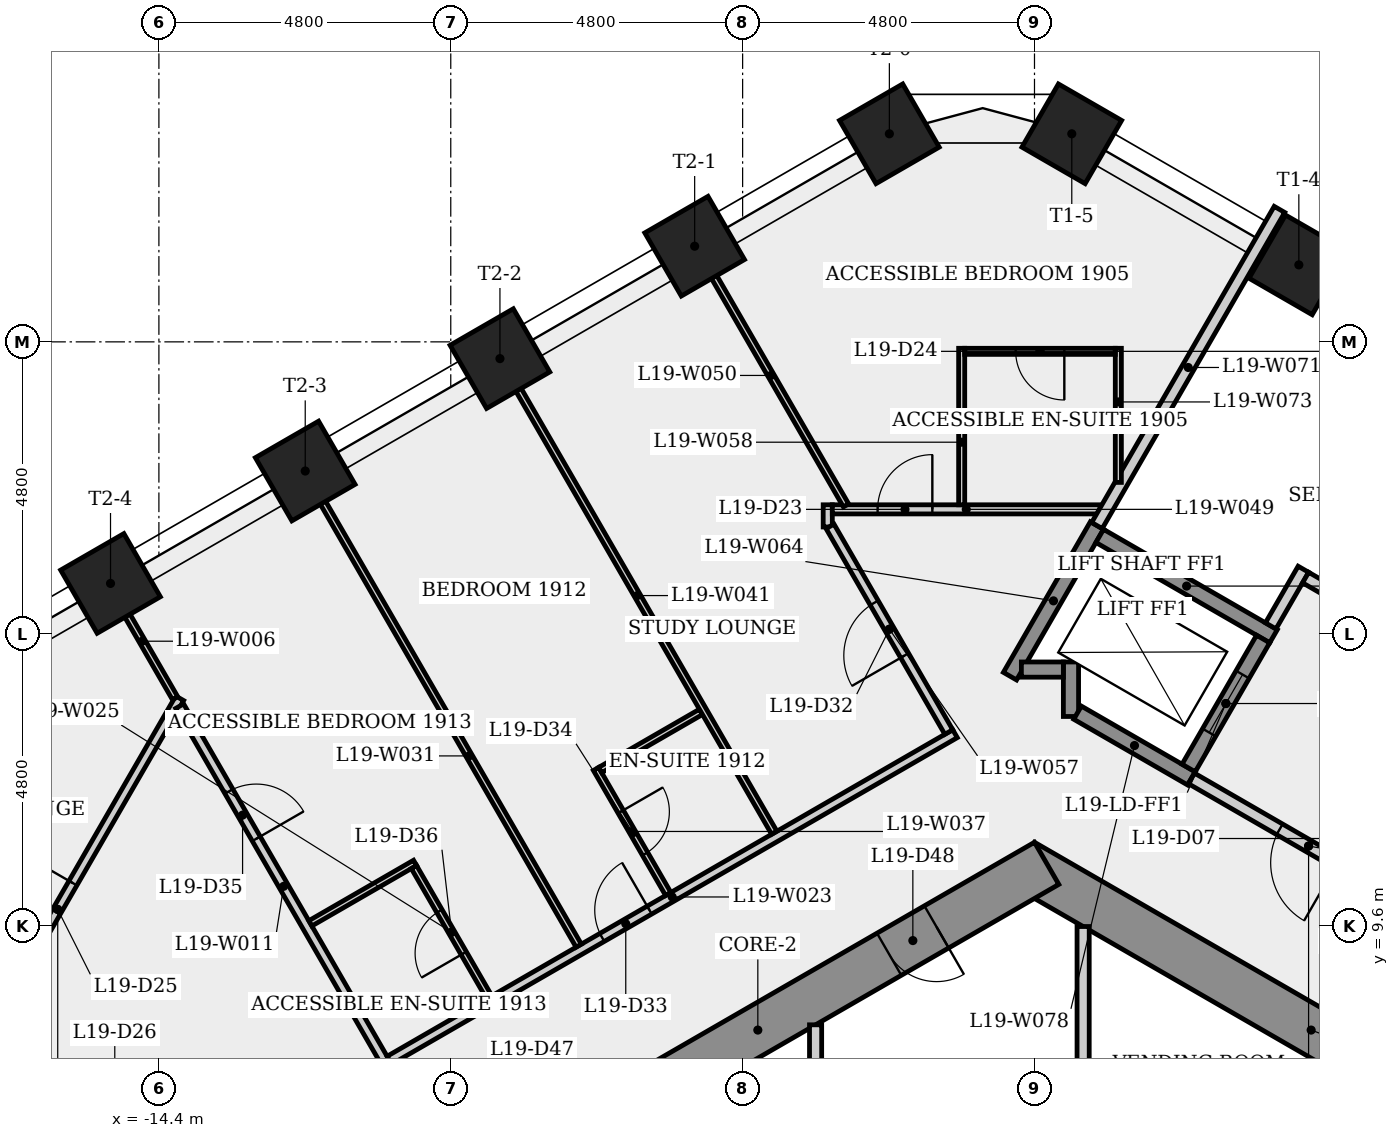
"""IFC4 building model, lengths in metres.
Left out: names, types, materials, properties, quantities, classifications, styles, units other than length and angle.
Written with IfcOpenShell. Run it as: python <this file> out.ifc"""

import sys

from ifc_helpers import new_model, si_unit, direction, frame, frame_2d, origin, origin_2d, place, context, subcontext, project, spatial, rectangle, extrude, element, fill, save


model = new_model("IFC4")
c1 = context("Model", 3, precision=1e-05, world=origin(), true_north=direction((0.0, 1.0)))
c2 = subcontext(c1, "Body", "Model", "MODEL_VIEW")
j1 = project(units=[si_unit("LENGTHUNIT", "METRE"), si_unit("PLANEANGLEUNIT", "RADIAN")], contexts=[c1])
p1 = place(None, origin())
s1 = spatial("IfcSite", under=j1, at=p1, CompositionType="ELEMENT")
p2 = place(p1, origin())
s2 = spatial("IfcBuilding", under=s1, at=p2, CompositionType="ELEMENT")
p3 = place(p2, frame((0.0, 0.0, 74.3)))
s3 = spatial("IfcBuildingStorey", under=s2, at=p3, CompositionType="ELEMENT", Elevation=74.3)
p4 = place(p3, frame((9.3, 5.138, 0.0), z_axis=(0.0, 0.0, 1.0), x_axis=(-0.866023993627, 0.500002442456, 0.0)))
e1 = element("IfcWall", 1, at=p4, inside=s3, PredefinedType="SHEAR", context=c2, shape_type="SweptSolid", body=[
    extrude(rectangle(XDim=10.97, YDim=0.8, at=frame_2d((5.485, 0.0))), origin(), (0.0, 0.0, 1.0), 4.0),
])
p5 = place(p4, frame((2.962, 0.0, 0.0)))
e2 = element("IfcOpeningElement", 2, at=p5, cuts=e1, PredefinedType="OPENING", context=c2, shape_type="SweptSolid", body=[
    extrude(rectangle(XDim=0.9, YDim=2.1, at=frame_2d((0.45, 1.05))), frame((0.0, 0.41, 0.0), z_axis=(0.0, -1.0, 0.0), x_axis=(1.0, 0.0, 0.0)), (0.0, 0.0, 1.0), 0.82),
])
p6 = place(p3, frame((0.2, 10.623, 0.0), z_axis=(0.0, 0.0, 1.0), x_axis=(-0.866023993627, -0.500002442456, 0.0)))
e3 = element("IfcWall", 3, at=p6, inside=s3, PredefinedType="SHEAR", context=c2, shape_type="SweptSolid", body=[
    extrude(rectangle(XDim=10.97, YDim=0.8, at=frame_2d((5.485, 0.0))), origin(), (0.0, 0.0, 1.0), 4.0),
])
p7 = place(p6, frame((9.325, 0.0, 0.0)))
e4 = element("IfcOpeningElement", 4, at=p7, cuts=e3, PredefinedType="OPENING", context=c2, shape_type="SweptSolid", body=[
    extrude(rectangle(XDim=0.9, YDim=2.1, at=frame_2d((0.45, 1.05))), frame((0.0, 0.41, 0.0), z_axis=(0.0, -1.0, 0.0), x_axis=(1.0, 0.0, 0.0)), (0.0, 0.0, 1.0), 0.82),
])
p8 = place(p6, frame((2.091, 0.0, 0.0)))
e5 = element("IfcOpeningElement", 5, at=p8, cuts=e3, PredefinedType="OPENING", context=c2, shape_type="SweptSolid", body=[
    extrude(rectangle(XDim=0.9, YDim=2.1, at=frame_2d((0.45, 1.05))), frame((0.0, 0.41, 0.0), z_axis=(0.0, -1.0, 0.0), x_axis=(1.0, 0.0, 0.0)), (0.0, 0.0, 1.0), 0.82),
])
for number, where, z_axis, x_axis in (
    (6, (4.348, 20.466, 0.0), (0.0, 0.0, 1.0), (0.5, 0.866, 0.0)),
    (7, (0.613, 22.622, 0.0), (0.0, 0.0, 1.0), (0.5, 0.866, 0.0)),
    (8, (-2.387, 22.622, 0.0), (0.0, 0.0, 1.0), (-0.5, 0.866, 0.0)),
    (9, (-5.589, 20.773, 0.0), (0.0, 0.0, 1.0), (-0.5, 0.866, 0.0)),
    (10, (-8.791, 18.924, 0.0), (0.0, 0.0, 1.0), (-0.5, 0.866, 0.0)),
    (11, (-11.993, 17.076, 0.0), (0.0, 0.0, 1.0), (-0.5, 0.866, 0.0)),
    (12, (-15.196, 15.227, 0.0), (0.0, 0.0, 1.0), (-0.5, 0.866, 0.0)),
):
    element("IfcColumn", number, at=place(p3, frame(where, z_axis=z_axis, x_axis=x_axis)), inside=s3, PredefinedType="COLUMN", context=c2, shape_type="SweptSolid", body=[
        extrude(rectangle(XDim=1.2, YDim=1.2, at=origin_2d()), origin(), (0.0, 0.0, 1.0), 4.0),
    ])
p9 = place(p3, frame((-18.07, 6.391, 0.0), z_axis=(0.0, 0.0, 1.0), x_axis=(0.500007837663, 0.86602087866, 0.0)))
e13 = element("IfcWall", 13, at=p9, inside=s3, PredefinedType="PARTITIONING", context=c2, shape_type="SweptSolid", body=[
    extrude(rectangle(XDim=8.022, YDim=0.15, at=frame_2d((4.011, 0.0))), origin(), (0.0, 0.0, 1.0), 3.6),
])
p10 = place(p9, frame((3.511, 0.0, 0.0)))
e14 = element("IfcOpeningElement", 14, at=p10, cuts=e13, PredefinedType="OPENING", context=c2, shape_type="SweptSolid", body=[
    extrude(rectangle(XDim=1.0, YDim=2.1, at=frame_2d((0.5, 1.05))), frame((0.0, 0.085, 0.0), z_axis=(0.0, -1.0, 0.0), x_axis=(1.0, 0.0, 0.0)), (0.0, 0.0, 1.0), 0.17),
])
p11 = place(p3, frame((-15.217, 15.215, 0.0), z_axis=(0.0, 0.0, 1.0), x_axis=(0.500005339912, -0.866022320763, 0.0)))
e15 = element("IfcWall", 15, at=p11, inside=s3, PredefinedType="PARTITIONING", context=c2, shape_type="SweptSolid", body=[
    extrude(rectangle(XDim=2.167, YDim=0.1, at=frame_2d((1.083, 0.0))), origin(), (0.0, 0.0, 1.0), 3.6),
])
p12 = place(p3, frame((-14.058, 13.208, 0.0), z_axis=(0.0, 0.0, 1.0), x_axis=(0.500010691388, -0.866019231021, 0.0)))
e16 = element("IfcWall", 16, at=p12, inside=s3, PredefinedType="PARTITIONING", context=c2, shape_type="SweptSolid", body=[
    extrude(rectangle(XDim=6.843, YDim=0.15, at=frame_2d((3.421, 0.0))), origin(), (0.0, 0.0, 1.0), 3.6),
])
p13 = place(p12, frame((1.619, 0.0, 0.0)))
e17 = element("IfcOpeningElement", 17, at=p13, cuts=e16, PredefinedType="OPENING", context=c2, shape_type="SweptSolid", body=[
    extrude(rectangle(XDim=0.9, YDim=2.1, at=frame_2d((0.45, 1.05))), frame((0.0, 0.085, 0.0), z_axis=(0.0, -1.0, 0.0), x_axis=(1.0, 0.0, 0.0)), (0.0, 0.0, 1.0), 0.17),
])
p14 = place(p3, frame((-10.609, 7.385, 0.0), z_axis=(0.0, 0.0, 1.0), x_axis=(0.866027371756, 0.499996591357, 0.0)))
e18 = element("IfcWall", 18, at=p14, inside=s3, PredefinedType="PARTITIONING", context=c2, shape_type="SweptSolid", body=[
    extrude(rectangle(XDim=10.741, YDim=0.15, at=frame_2d((5.371, 0.0))), origin(), (0.0, 0.0, 1.0), 3.6),
])
p15 = place(p14, frame((4.039, 0.0, 0.0)))
e19 = element("IfcOpeningElement", 19, at=p15, cuts=e18, PredefinedType="OPENING", context=c2, shape_type="SweptSolid", body=[
    extrude(rectangle(XDim=0.9, YDim=2.1, at=frame_2d((0.45, 1.05))), frame((0.0, 0.085, 0.0), z_axis=(0.0, -1.0, 0.0), x_axis=(1.0, 0.0, 0.0)), (0.0, 0.0, 1.0), 0.17),
])
p16 = place(p3, frame((-10.187, 10.631, 0.0), z_axis=(0.0, 0.0, 1.0), x_axis=(-0.866058830921, -0.499942098031, 0.0)))
e20 = element("IfcWall", 20, at=p16, inside=s3, PredefinedType="PARTITIONING", context=c2, shape_type="SweptSolid", body=[
    extrude(rectangle(XDim=1.989, YDim=0.1, at=frame_2d((0.994, 0.0))), origin(), (0.0, 0.0, 1.0), 3.6),
])
p17 = place(p3, frame((-8.968, 8.419, 0.0), z_axis=(0.0, 0.0, 1.0), x_axis=(-0.4999899861, 0.866031185235, 0.0)))
e21 = element("IfcWall", 21, at=p17, inside=s3, PredefinedType="PARTITIONING", context=c2, shape_type="SweptSolid", body=[
    extrude(rectangle(XDim=2.475, YDim=0.1, at=frame_2d((1.238, 0.0))), origin(), (0.0, 0.0, 1.0), 3.6),
])
p18 = place(p17, frame((0.837, 0.0, 0.0)))
e22 = element("IfcOpeningElement", 22, at=p18, cuts=e21, PredefinedType="OPENING", context=c2, shape_type="SweptSolid", body=[
    extrude(rectangle(XDim=0.8, YDim=2.1, at=frame_2d((0.4, 1.05))), frame((0.0, 0.06, 0.0), z_axis=(0.0, -1.0, 0.0), x_axis=(1.0, 0.0, 0.0)), (0.0, 0.0, 1.0), 0.12),
])
p19 = place(p3, frame((-7.496, 9.269, 0.0), z_axis=(0.0, 0.0, 1.0), x_axis=(-0.500009404554, 0.866019973994, 0.0)))
e23 = element("IfcWall", 23, at=p19, inside=s3, PredefinedType="PARTITIONING", context=c2, shape_type="SweptSolid", body=[
    extrude(rectangle(XDim=9.01, YDim=0.1, at=frame_2d((4.505, 0.0))), origin(), (0.0, 0.0, 1.0), 3.6),
])
p20 = place(p3, frame((-7.211, 12.176, 0.0), z_axis=(0.0, 0.0, 1.0), x_axis=(0.499986429846, -0.866033238375, 0.0)))
e24 = element("IfcWall", 24, at=p20, inside=s3, PredefinedType="PARTITIONING", context=c2, shape_type="SweptSolid", body=[
    extrude(rectangle(XDim=2.375, YDim=0.1, at=frame_2d((1.188, 0.0))), origin(), (0.0, 0.0, 1.0), 3.6),
])
p21 = place(p20, frame((0.812, 0.0, 0.0)))
e25 = element("IfcOpeningElement", 25, at=p21, cuts=e24, PredefinedType="OPENING", context=c2, shape_type="SweptSolid", body=[
    extrude(rectangle(XDim=0.8, YDim=2.1, at=frame_2d((0.4, 1.05))), frame((0.0, 0.06, 0.0), z_axis=(0.0, -1.0, 0.0), x_axis=(1.0, 0.0, 0.0)), (0.0, 0.0, 1.0), 0.12),
])
p22 = place(p3, frame((-5.485, 13.115, 0.0), z_axis=(0.0, 0.0, 1.0), x_axis=(-0.866005020067, -0.500035303972, 0.0)))
e26 = element("IfcWall", 26, at=p22, inside=s3, PredefinedType="PARTITIONING", context=c2, shape_type="SweptSolid", body=[
    extrude(rectangle(XDim=1.914, YDim=0.1, at=frame_2d((0.957, 0.0))), origin(), (0.0, 0.0, 1.0), 3.6),
])
p23 = place(p3, frame((-8.784, 18.928, 0.0), z_axis=(0.0, 0.0, 1.0), x_axis=(0.500009404554, -0.866019973994, 0.0)))
e27 = element("IfcWall", 27, at=p23, inside=s3, PredefinedType="PARTITIONING", context=c2, shape_type="SweptSolid", body=[
    extrude(rectangle(XDim=9.01, YDim=0.1, at=frame_2d((4.505, 0.0))), origin(), (0.0, 0.0, 1.0), 3.6),
])
p24 = place(p3, frame((-3.6, 7.967, 0.0), z_axis=(0.0, 0.0, 1.0), x_axis=(0.0, -1.0, 0.0)))
e28 = element("IfcWall", 28, at=p24, inside=s3, PredefinedType="PARTITIONING", context=c2, shape_type="SweptSolid", body=[
    extrude(rectangle(XDim=2.692, YDim=0.2, at=frame_2d((1.346, 0.0))), origin(), (0.0, 0.0, 1.0), 3.6),
])
p25 = place(p3, frame((-3.4, 16.155, 0.0), z_axis=(0.0, 0.0, 1.0), x_axis=(0.0, 1.0, 0.0)))
e29 = element("IfcWall", 29, at=p25, inside=s3, PredefinedType="PARTITIONING", context=c2, shape_type="SweptSolid", body=[
    extrude(rectangle(XDim=0.365, YDim=0.15, at=frame_2d((0.182, 0.0))), origin(), (0.0, 0.0, 1.0), 3.6),
])
p26 = place(p3, frame((-3.325, 16.445, 0.0), z_axis=(0.0, 0.0, 1.0), x_axis=(1.0, 0.0, 0.0)))
e30 = element("IfcWall", 30, at=p26, inside=s3, PredefinedType="PARTITIONING", context=c2, shape_type="SweptSolid", body=[
    extrude(rectangle(XDim=4.406, YDim=0.15, at=frame_2d((2.203, 0.0))), origin(), (0.0, 0.0, 1.0), 3.6),
])
p27 = place(p26, frame((0.745, 0.0, 0.0)))
e31 = element("IfcOpeningElement", 31, at=p27, cuts=e30, PredefinedType="OPENING", context=c2, shape_type="SweptSolid", body=[
    extrude(rectangle(XDim=0.9, YDim=2.1, at=frame_2d((0.45, 1.05))), frame((0.0, 0.085, 0.0), z_axis=(0.0, -1.0, 0.0), x_axis=(1.0, 0.0, 0.0)), (0.0, 0.0, 1.0), 0.17),
])
p28 = place(p3, frame((-3.1, 16.51, 0.0), z_axis=(0.0, 0.0, 1.0), x_axis=(-0.500016396673, 0.866015936954, 0.0)))
e32 = element("IfcWall", 32, at=p28, inside=s3, PredefinedType="PARTITIONING", context=c2, shape_type="SweptSolid", body=[
    extrude(rectangle(XDim=4.937, YDim=0.1, at=frame_2d((2.468, 0.0))), origin(), (0.0, 0.0, 1.0), 3.6),
])
p29 = place(p3, frame((-1.41, 12.783, 0.0), z_axis=(0.0, 0.0, 1.0), x_axis=(-0.499991187483, 0.866030491634, 0.0)))
e33 = element("IfcWall", 33, at=p29, inside=s3, PredefinedType="PARTITIONING", context=c2, shape_type="SweptSolid", body=[
    extrude(rectangle(XDim=3.906, YDim=0.15, at=frame_2d((1.953, 0.0))), origin(), (0.0, 0.0, 1.0), 3.6),
])
p30 = place(p29, frame((1.453, 0.0, 0.0)))
e34 = element("IfcOpeningElement", 34, at=p30, cuts=e33, PredefinedType="OPENING", context=c2, shape_type="SweptSolid", body=[
    extrude(rectangle(XDim=1.0, YDim=2.1, at=frame_2d((0.5, 1.05))), frame((0.0, 0.085, 0.0), z_axis=(0.0, -1.0, 0.0), x_axis=(1.0, 0.0, 0.0)), (0.0, 0.0, 1.0), 0.17),
])
p31 = place(p3, frame((-1.198, 19.094, 0.0), z_axis=(0.0, 0.0, 1.0), x_axis=(0.0, -1.0, 0.0)))
e35 = element("IfcWall", 35, at=p31, inside=s3, PredefinedType="PARTITIONING", context=c2, shape_type="SweptSolid", body=[
    extrude(rectangle(XDim=2.574, YDim=0.1, at=frame_2d((1.287, 0.0))), origin(), (0.0, 0.0, 1.0), 3.6),
])
p32 = place(p3, frame((-0.403, 13.702, 0.0), z_axis=(0.0, 0.0, 1.0), x_axis=(0.499976111731, 0.866039195244, 0.0)))
e36 = element("IfcWall", 36, at=p32, inside=s3, PredefinedType="SHEAR", context=c2, shape_type="SweptSolid", body=[
    extrude(rectangle(XDim=2.861, YDim=0.25, at=frame_2d((1.43, 0.0))), origin(), (0.0, 0.0, 1.0), 3.6),
])
p33 = place(p3, frame((0.6, 13.039, 0.0), z_axis=(0.0, 0.0, 1.0), x_axis=(0.0, 1.0, 0.0)))
e37 = element("IfcWall", 37, at=p33, inside=s3, PredefinedType="SHEAR", context=c2, shape_type="SweptSolid", body=[
    extrude(rectangle(XDim=0.896, YDim=0.25, at=frame_2d((0.448, 0.0))), origin(), (0.0, 0.0, 1.0), 3.6),
])
p34 = place(p3, frame((0.475, 13.81, 0.0), z_axis=(0.0, 0.0, 1.0), x_axis=(-1.0, 0.0, 0.0)))
e38 = element("IfcWall", 38, at=p34, inside=s3, PredefinedType="SHEAR", context=c2, shape_type="SweptSolid", body=[
    extrude(rectangle(XDim=0.691, YDim=0.25, at=frame_2d((0.345, 0.0))), origin(), (0.0, 0.0, 1.0), 4.0),
])
p35 = place(p3, frame((0.8, 9.584, 0.0), z_axis=(0.0, 0.0, 1.0), x_axis=(0.0, -1.0, 0.0)))
e39 = element("IfcWall", 39, at=p35, inside=s3, PredefinedType="PARTITIONING", context=c2, shape_type="SweptSolid", body=[
    extrude(rectangle(XDim=4.309, YDim=0.2, at=frame_2d((2.155, 0.0))), origin(), (0.0, 0.0, 1.0), 3.6),
])
p36 = place(p3, frame((1.027, 16.179, 0.0), z_axis=(0.0, 0.0, 1.0), x_axis=(0.500005224826, 0.866022387209, 0.0)))
e40 = element("IfcWall", 40, at=p36, inside=s3, PredefinedType="PLUMBINGWALL", context=c2, shape_type="SweptSolid", body=[
    extrude(rectangle(XDim=6.004, YDim=0.2, at=frame_2d((3.002, 0.0))), origin(), (0.0, 0.0, 1.0), 3.6),
])
p37 = place(p3, frame((1.073, 16.008, 0.0), z_axis=(0.0, 0.0, 1.0), x_axis=(0.866040211805, -0.499974350878, 0.0)))
e41 = element("IfcWall", 41, at=p37, inside=s3, PredefinedType="SHEAR", context=c2, shape_type="SweptSolid", body=[
    extrude(rectangle(XDim=3.3, YDim=0.25, at=frame_2d((1.65, 0.0))), origin(), (0.0, 0.0, 1.0), 3.6),
])
p38 = place(p3, frame((1.379, 16.888, 0.0), z_axis=(0.0, 0.0, 1.0), x_axis=(0.0, 1.0, 0.0)))
e42 = element("IfcWall", 42, at=p38, inside=s3, PredefinedType="PARTITIONING", context=c2, shape_type="SweptSolid", body=[
    extrude(rectangle(XDim=2.206, YDim=0.1, at=frame_2d((1.103, 0.0))), origin(), (0.0, 0.0, 1.0), 3.6),
])
p39 = place(p3, frame((1.329, 19.044, 0.0), z_axis=(0.0, 0.0, 1.0), x_axis=(-1.0, 0.0, 0.0)))
e43 = element("IfcWall", 43, at=p39, inside=s3, PredefinedType="PARTITIONING", context=c2, shape_type="SweptSolid", body=[
    extrude(rectangle(XDim=2.476, YDim=0.1, at=frame_2d((1.238, 0.0))), origin(), (0.0, 0.0, 1.0), 3.6),
])
p40 = place(p39, frame((0.838, 0.0, 0.0)))
e44 = element("IfcOpeningElement", 44, at=p40, cuts=e43, PredefinedType="OPENING", context=c2, shape_type="SweptSolid", body=[
    extrude(rectangle(XDim=0.8, YDim=2.1, at=frame_2d((0.4, 1.05))), frame((0.0, 0.06, 0.0), z_axis=(0.0, -1.0, 0.0), x_axis=(1.0, 0.0, 0.0)), (0.0, 0.0, 1.0), 0.12),
])
p41 = place(p3, frame((2.581, 12.02, 0.0), z_axis=(0.0, 0.0, 1.0), x_axis=(-0.86603892542, 0.499976579108, 0.0)))
e45 = element("IfcWall", 45, at=p41, inside=s3, PredefinedType="SHEAR", context=c2, shape_type="SweptSolid", body=[
    extrude(rectangle(XDim=2.162, YDim=0.25, at=frame_2d((1.081, 0.0))), origin(), (0.0, 0.0, 1.0), 3.6),
])
p42 = place(p3, frame((2.535, 12.191, 0.0), z_axis=(0.0, 0.0, 1.0), x_axis=(0.500061746146, 0.865989751695, 0.0)))
e46 = element("IfcWall", 46, at=p42, inside=s3, PredefinedType="SHEAR", context=c2, shape_type="SweptSolid", body=[
    extrude(rectangle(XDim=2.45, YDim=0.25, at=frame_2d((1.225, 0.0))), origin(), (0.0, 0.0, 1.0), 4.0),
])
p43 = place(p42, frame((0.675, 0.0, 0.0)))
e47 = element("IfcOpeningElement", 47, at=p43, cuts=e46, PredefinedType="OPENING", context=c2, shape_type="SweptSolid", body=[
    extrude(rectangle(XDim=1.1, YDim=2.1, at=frame_2d((0.55, 1.05))), frame((0.0, 0.135, 0.0), z_axis=(0.0, -1.0, 0.0), x_axis=(1.0, 0.0, 0.0)), (0.0, 0.0, 1.0), 0.27),
])
p44 = place(p3, frame((3.885, 14.529, 0.0), z_axis=(0.0, 0.0, 1.0), x_axis=(0.499997628298, 0.866026773083, 0.0)))
e48 = element("IfcWall", 48, at=p44, inside=s3, PredefinedType="PLUMBINGWALL", context=c2, shape_type="SweptSolid", body=[
    extrude(rectangle(XDim=1.075, YDim=0.2, at=frame_2d((0.538, 0.0))), origin(), (0.0, 0.0, 1.0), 3.6),
])
p45 = place(p3, frame((4.459, 15.323, 0.0), z_axis=(0.0, 0.0, 1.0), x_axis=(0.866016039709, -0.500016218704, 0.0)))
e49 = element("IfcWall", 49, at=p45, inside=s3, PredefinedType="PLUMBINGWALL", context=c2, shape_type="SweptSolid", body=[
    extrude(rectangle(XDim=4.7, YDim=0.2, at=frame_2d((2.35, 0.0))), origin(), (0.0, 0.0, 1.0), 3.6),
])
p46 = place(p3, frame((6.435, 9.795, 0.0), z_axis=(0.0, 0.0, 1.0), x_axis=(-0.866012907634, 0.500021643343, 0.0)))
e50 = element("IfcWall", 50, at=p46, inside=s3, PredefinedType="PARTITIONING", context=c2, shape_type="SweptSolid", body=[
    extrude(rectangle(XDim=4.45, YDim=0.2, at=frame_2d((2.225, 0.0))), origin(), (0.0, 0.0, 1.0), 3.6),
])
p47 = place(p46, frame((1.675, 0.0, 0.0)))
e51 = element("IfcOpeningElement", 51, at=p47, cuts=e50, PredefinedType="OPENING", context=c2, shape_type="SweptSolid", body=[
    extrude(rectangle(XDim=1.1, YDim=2.1, at=frame_2d((0.55, 1.05))), frame((0.0, 0.11, 0.0), z_axis=(0.0, -1.0, 0.0), x_axis=(1.0, 0.0, 0.0)), (0.0, 0.0, 1.0), 0.22),
])
p48 = place(p47, origin())
e52 = element("IfcDoor", 52, at=p48, inside=s3, OperationType="SINGLE_SWING_LEFT", PredefinedType="DOOR", context=c2, shape_type="SweptSolid", body=[
    extrude(rectangle(XDim=1.1, YDim=2.1, at=frame_2d((0.55, 1.05))), frame((0.0, 0.025, 0.0), z_axis=(0.0, -1.0, 0.0), x_axis=(1.0, 0.0, 0.0)), (0.0, 0.0, 1.0), 0.05),
])
fill(e51, e52)
p49 = place(p43, origin())
e53 = element("IfcDoor", 53, at=p49, inside=s3, OperationType="SLIDING_TO_LEFT", PredefinedType="DOOR", context=c2, shape_type="SweptSolid", body=[
    extrude(rectangle(XDim=1.1, YDim=2.1, at=frame_2d((0.55, 1.05))), frame((0.0, 0.025, 0.0), z_axis=(0.0, -1.0, 0.0), x_axis=(1.0, 0.0, 0.0)), (0.0, 0.0, 1.0), 0.05),
])
fill(e47, e53)
p50 = place(p27, origin())
e54 = element("IfcDoor", 54, at=p50, inside=s3, OperationType="SINGLE_SWING_RIGHT", PredefinedType="DOOR", context=c2, shape_type="SweptSolid", body=[
    extrude(rectangle(XDim=0.9, YDim=2.1, at=frame_2d((0.45, 1.05))), frame((0.0, 0.025, 0.0), z_axis=(0.0, -1.0, 0.0), x_axis=(1.0, 0.0, 0.0)), (0.0, 0.0, 1.0), 0.05),
])
fill(e31, e54)
p51 = place(p40, origin())
e55 = element("IfcDoor", 55, at=p51, inside=s3, OperationType="SINGLE_SWING_LEFT", PredefinedType="DOOR", context=c2, shape_type="SweptSolid", body=[
    extrude(rectangle(XDim=0.8, YDim=2.1, at=frame_2d((0.4, 1.05))), frame((0.0, 0.025, 0.0), z_axis=(0.0, -1.0, 0.0), x_axis=(1.0, 0.0, 0.0)), (0.0, 0.0, 1.0), 0.05),
])
fill(e44, e55)
p52 = place(p10, origin())
e56 = element("IfcDoor", 56, at=p52, inside=s3, OperationType="SINGLE_SWING_RIGHT", PredefinedType="DOOR", context=c2, shape_type="SweptSolid", body=[
    extrude(rectangle(XDim=1.0, YDim=2.1, at=frame_2d((0.5, 1.05))), frame((0.0, 0.025, 0.0), z_axis=(0.0, -1.0, 0.0), x_axis=(1.0, 0.0, 0.0)), (0.0, 0.0, 1.0), 0.05),
])
fill(e14, e56)
p53 = place(p30, origin())
e57 = element("IfcDoor", 57, at=p53, inside=s3, OperationType="SINGLE_SWING_LEFT", PredefinedType="DOOR", context=c2, shape_type="SweptSolid", body=[
    extrude(rectangle(XDim=1.0, YDim=2.1, at=frame_2d((0.5, 1.05))), frame((0.0, 0.025, 0.0), z_axis=(0.0, -1.0, 0.0), x_axis=(1.0, 0.0, 0.0)), (0.0, 0.0, 1.0), 0.05),
])
fill(e34, e57)
p54 = place(p15, origin())
e58 = element("IfcDoor", 58, at=p54, inside=s3, OperationType="SINGLE_SWING_RIGHT", PredefinedType="DOOR", context=c2, shape_type="SweptSolid", body=[
    extrude(rectangle(XDim=0.9, YDim=2.1, at=frame_2d((0.45, 1.05))), frame((0.0, 0.025, 0.0), z_axis=(0.0, -1.0, 0.0), x_axis=(1.0, 0.0, 0.0)), (0.0, 0.0, 1.0), 0.05),
])
fill(e19, e58)
p55 = place(p21, origin())
e59 = element("IfcDoor", 59, at=p55, inside=s3, OperationType="SINGLE_SWING_LEFT", PredefinedType="DOOR", context=c2, shape_type="SweptSolid", body=[
    extrude(rectangle(XDim=0.8, YDim=2.1, at=frame_2d((0.4, 1.05))), frame((0.0, 0.025, 0.0), z_axis=(0.0, -1.0, 0.0), x_axis=(1.0, 0.0, 0.0)), (0.0, 0.0, 1.0), 0.05),
])
fill(e25, e59)
p56 = place(p13, origin())
e60 = element("IfcDoor", 60, at=p56, inside=s3, OperationType="SINGLE_SWING_RIGHT", PredefinedType="DOOR", context=c2, shape_type="SweptSolid", body=[
    extrude(rectangle(XDim=0.9, YDim=2.1, at=frame_2d((0.45, 1.05))), frame((0.0, 0.025, 0.0), z_axis=(0.0, -1.0, 0.0), x_axis=(1.0, 0.0, 0.0)), (0.0, 0.0, 1.0), 0.05),
])
fill(e17, e60)
p57 = place(p18, origin())
e61 = element("IfcDoor", 61, at=p57, inside=s3, OperationType="SINGLE_SWING_LEFT", PredefinedType="DOOR", context=c2, shape_type="SweptSolid", body=[
    extrude(rectangle(XDim=0.8, YDim=2.1, at=frame_2d((0.4, 1.05))), frame((0.0, 0.025, 0.0), z_axis=(0.0, -1.0, 0.0), x_axis=(1.0, 0.0, 0.0)), (0.0, 0.0, 1.0), 0.05),
])
fill(e22, e61)
p58 = place(p8, origin())
e62 = element("IfcDoor", 62, at=p58, inside=s3, OperationType="SINGLE_SWING_LEFT", PredefinedType="DOOR", context=c2, shape_type="SweptSolid", body=[
    extrude(rectangle(XDim=0.9, YDim=2.1, at=frame_2d((0.45, 1.05))), frame((0.0, 0.025, 0.0), z_axis=(0.0, -1.0, 0.0), x_axis=(1.0, 0.0, 0.0)), (0.0, 0.0, 1.0), 0.05),
])
fill(e5, e62)
save(model, sys.argv[1])
